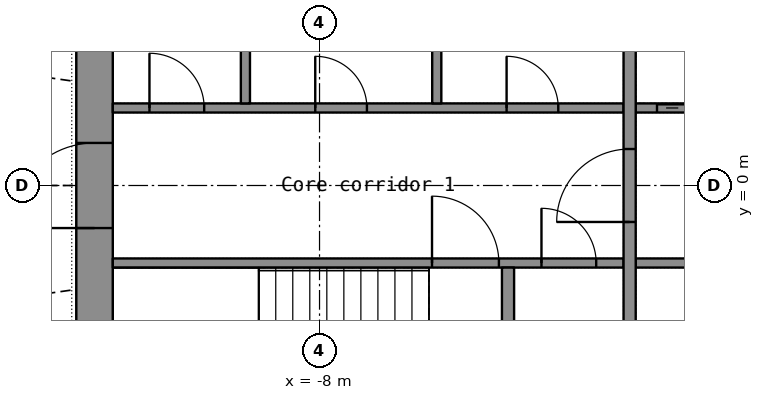
"""IFC4 building model, lengths in metres.
Left out: names, types, materials, properties, quantities, classifications, styles, units other than length and angle.
Written with IfcOpenShell. Run it as: python <this file> out.ifc"""

import sys

from ifc_helpers import new_model, si_unit, direction, frame, frame_2d, origin, place, context, subcontext, project, spatial, rectangle, extrude, element, fill, save


model = new_model("IFC4")
c1 = context("Model", 3, precision=1e-05, world=origin(), true_north=direction((0.0, 1.0)))
c2 = subcontext(c1, "Body", "Model", "MODEL_VIEW")
j1 = project(units=[si_unit("LENGTHUNIT", "METRE"), si_unit("PLANEANGLEUNIT", "RADIAN")], contexts=[c1])
p1 = place(None, origin())
s1 = spatial("IfcSite", under=j1, at=p1, CompositionType="ELEMENT")
p2 = place(p1, origin())
s2 = spatial("IfcBuilding", under=s1, at=p2, CompositionType="ELEMENT")
p3 = place(p2, frame((0.0, 0.0, 37.1)))
s3 = spatial("IfcBuildingStorey", under=s2, at=p3, CompositionType="ELEMENT", Elevation=37.1)
p4 = place(p3, frame((-11.7, -7.2, 0.0), z_axis=(0.0, 0.0, 1.0), x_axis=(0.0, 1.0, 0.0)))
e1 = element("IfcWall", 1, at=p4, inside=s3, PredefinedType="SHEAR", context=c2, shape_type="SweptSolid", body=[
    extrude(rectangle(XDim=14.4, YDim=0.6, at=frame_2d((7.2, 0.0))), origin(), (0.0, 0.0, 1.0), 3.3),
])
p5 = place(p4, frame((6.5, 0.0, 0.0)))
e2 = element("IfcOpeningElement", 2, at=p5, cuts=e1, PredefinedType="OPENING", context=c2, shape_type="SweptSolid", body=[
    extrude(rectangle(XDim=1.4, YDim=2.2, at=frame_2d((0.7, 1.1))), frame((0.0, 0.31, 0.0), z_axis=(0.0, -1.0, 0.0), x_axis=(1.0, 0.0, 0.0)), (0.0, 0.0, 1.0), 0.62),
])
p6 = place(p3, frame((-11.4, -1.275, 0.0), z_axis=(0.0, 0.0, 1.0), x_axis=(1.0, 0.0, 0.0)))
e3 = element("IfcWall", 3, at=p6, inside=s3, PredefinedType="SHEAR", context=c2, shape_type="SweptSolid", body=[
    extrude(rectangle(XDim=8.4, YDim=0.15, at=frame_2d((4.2, 0.0))), origin(), (0.0, 0.0, 1.0), 3.3),
])
p7 = place(p6, frame((5.25, 0.0, 0.0)))
e4 = element("IfcOpeningElement", 4, at=p7, cuts=e3, PredefinedType="OPENING", context=c2, shape_type="SweptSolid", body=[
    extrude(rectangle(XDim=1.1, YDim=2.15, at=frame_2d((0.55, 1.075))), frame((0.0, 0.085, 0.0), z_axis=(0.0, -1.0, 0.0), x_axis=(1.0, 0.0, 0.0)), (0.0, 0.0, 1.0), 0.17),
])
p8 = place(p6, frame((7.05, 0.0, 0.0)))
e5 = element("IfcOpeningElement", 5, at=p8, cuts=e3, PredefinedType="OPENING", context=c2, shape_type="SweptSolid", body=[
    extrude(rectangle(XDim=0.9, YDim=2.1, at=frame_2d((0.45, 1.05))), frame((0.0, 0.085, 0.0), z_axis=(0.0, -1.0, 0.0), x_axis=(1.0, 0.0, 0.0)), (0.0, 0.0, 1.0), 0.17),
])
p9 = place(p3, frame((-2.8, -1.275, 0.0), z_axis=(0.0, 0.0, 1.0), x_axis=(1.0, 0.0, 0.0)))
e6 = element("IfcWall", 6, at=p9, inside=s3, PredefinedType="SHEAR", context=c2, shape_type="SweptSolid", body=[
    extrude(rectangle(XDim=5.6, YDim=0.15, at=frame_2d((2.8, 0.0))), origin(), (0.0, 0.0, 1.0), 3.3),
])
p10 = place(p9, frame((4.15, 0.0, 0.0)))
e7 = element("IfcOpeningElement", 7, at=p10, cuts=e6, PredefinedType="OPENING", context=c2, shape_type="SweptSolid", body=[
    extrude(rectangle(XDim=1.1, YDim=2.2, at=frame_2d((0.55, 1.1))), frame((0.0, 0.085, 0.0), z_axis=(0.0, -1.0, 0.0), x_axis=(1.0, 0.0, 0.0)), (0.0, 0.0, 1.0), 0.17),
])
p11 = place(p9, frame((1.35, 0.0, 0.0)))
e8 = element("IfcOpeningElement", 8, at=p11, cuts=e6, PredefinedType="OPENING", context=c2, shape_type="SweptSolid", body=[
    extrude(rectangle(XDim=0.9, YDim=2.1, at=frame_2d((0.45, 1.05))), frame((0.0, 0.085, 0.0), z_axis=(0.0, -1.0, 0.0), x_axis=(1.0, 0.0, 0.0)), (0.0, 0.0, 1.0), 0.17),
])
p12 = place(p3, frame((-11.4, 1.275, 0.0), z_axis=(0.0, 0.0, 1.0), x_axis=(1.0, 0.0, 0.0)))
e9 = element("IfcWall", 9, at=p12, inside=s3, PredefinedType="PARTITIONING", context=c2, shape_type="SweptSolid", body=[
    extrude(rectangle(XDim=8.4, YDim=0.15, at=frame_2d((4.2, 0.0))), origin(), (0.0, 0.0, 1.0), 3.3),
])
p13 = place(p12, frame((0.603, 0.0, 0.0)))
e10 = element("IfcOpeningElement", 10, at=p13, cuts=e9, PredefinedType="OPENING", context=c2, shape_type="SweptSolid", body=[
    extrude(rectangle(XDim=0.9, YDim=2.1, at=frame_2d((0.45, 1.05))), frame((0.0, 0.085, 0.0), z_axis=(0.0, -1.0, 0.0), x_axis=(1.0, 0.0, 0.0)), (0.0, 0.0, 1.0), 0.17),
])
p14 = place(p12, frame((3.33, 0.0, 0.0)))
e11 = element("IfcOpeningElement", 11, at=p14, cuts=e9, PredefinedType="OPENING", context=c2, shape_type="SweptSolid", body=[
    extrude(rectangle(XDim=0.85, YDim=2.1, at=frame_2d((0.425, 1.05))), frame((0.0, 0.085, 0.0), z_axis=(0.0, -1.0, 0.0), x_axis=(1.0, 0.0, 0.0)), (0.0, 0.0, 1.0), 0.17),
])
p15 = place(p12, frame((6.477, 0.0, 0.0)))
e12 = element("IfcOpeningElement", 12, at=p15, cuts=e9, PredefinedType="OPENING", context=c2, shape_type="SweptSolid", body=[
    extrude(rectangle(XDim=0.85, YDim=2.1, at=frame_2d((0.425, 1.05))), frame((0.0, 0.085, 0.0), z_axis=(0.0, -1.0, 0.0), x_axis=(1.0, 0.0, 0.0)), (0.0, 0.0, 1.0), 0.17),
])
p16 = place(p3, frame((-2.8, 1.275, 0.0), z_axis=(0.0, 0.0, 1.0), x_axis=(1.0, 0.0, 0.0)))
e13 = element("IfcWall", 13, at=p16, inside=s3, PredefinedType="SHEAR", context=c2, shape_type="SweptSolid", body=[
    extrude(rectangle(XDim=5.6, YDim=0.15, at=frame_2d((2.8, 0.0))), origin(), (0.0, 0.0, 1.0), 3.3),
])
p17 = place(p16, frame((0.35, 0.0, 0.0)))
e14 = element("IfcOpeningElement", 14, at=p17, cuts=e13, PredefinedType="OPENING", context=c2, shape_type="SweptSolid", body=[
    extrude(rectangle(XDim=1.1, YDim=2.2, at=frame_2d((0.55, 1.1))), frame((0.0, 0.085, 0.0), z_axis=(0.0, -1.0, 0.0), x_axis=(1.0, 0.0, 0.0)), (0.0, 0.0, 1.0), 0.17),
])
p18 = place(p16, frame((3.35, 0.0, 0.0)))
e15 = element("IfcOpeningElement", 15, at=p18, cuts=e13, PredefinedType="OPENING", context=c2, shape_type="SweptSolid", body=[
    extrude(rectangle(XDim=0.9, YDim=2.1, at=frame_2d((0.45, 1.05))), frame((0.0, 0.085, 0.0), z_axis=(0.0, -1.0, 0.0), x_axis=(1.0, 0.0, 0.0)), (0.0, 0.0, 1.0), 0.17),
])
p19 = place(p3, frame((-2.9, -3.7, 0.0), z_axis=(0.0, 0.0, 1.0), x_axis=(0.0, 1.0, 0.0)))
e16 = element("IfcWall", 16, at=p19, inside=s3, PredefinedType="SHEAR", context=c2, shape_type="SweptSolid", body=[
    extrude(rectangle(XDim=7.4, YDim=0.2, at=frame_2d((3.7, 0.0))), origin(), (0.0, 0.0, 1.0), 3.3),
])
p20 = place(p19, frame((3.1, 0.0, 0.0)))
e17 = element("IfcOpeningElement", 17, at=p20, cuts=e16, PredefinedType="OPENING", context=c2, shape_type="SweptSolid", body=[
    extrude(rectangle(XDim=1.2, YDim=2.2, at=frame_2d((0.6, 1.1))), frame((0.0, 0.11, 0.0), z_axis=(0.0, -1.0, 0.0), x_axis=(1.0, 0.0, 0.0)), (0.0, 0.0, 1.0), 0.22),
])
p21 = place(p3, frame((-4.9, -3.7, 0.0), z_axis=(0.0, 0.0, 1.0), x_axis=(0.0, 1.0, 0.0)))
e18 = element("IfcWall", 18, at=p21, inside=s3, PredefinedType="SHEAR", context=c2, shape_type="SweptSolid", body=[
    extrude(rectangle(XDim=2.35, YDim=0.2, at=frame_2d((1.175, 0.0))), origin(), (0.0, 0.0, 1.0), 3.3),
])
for number, where, z_axis, x_axis in (
    (19, (-9.219, 1.35, 0.0), (0.0, 0.0, 1.0), (0.0, 1.0, 0.0)),
    (20, (-6.072, 1.35, 0.0), (0.0, 0.0, 1.0), (0.0, 1.0, 0.0)),
):
    element("IfcWall", number, at=place(p3, frame(where, z_axis=z_axis, x_axis=x_axis)), inside=s3, PredefinedType="PARTITIONING", context=c2, shape_type="SweptSolid", body=[
        extrude(rectangle(XDim=2.35, YDim=0.15, at=frame_2d((1.175, 0.0))), origin(), (0.0, 0.0, 1.0), 3.3),
    ])
p22 = place(p5, origin())
e21 = element("IfcDoor", 21, at=p22, inside=s3, OperationType="DOUBLE_DOOR_SINGLE_SWING", PredefinedType="DOOR", context=c2, shape_type="SweptSolid", body=[
    extrude(rectangle(XDim=1.4, YDim=2.2, at=frame_2d((0.7, 1.1))), frame((0.0, 0.025, 0.0), z_axis=(0.0, -1.0, 0.0), x_axis=(1.0, 0.0, 0.0)), (0.0, 0.0, 1.0), 0.05),
])
fill(e2, e21)
p23 = place(p20, origin())
e22 = element("IfcDoor", 22, at=p23, inside=s3, OperationType="SINGLE_SWING_LEFT", PredefinedType="DOOR", context=c2, shape_type="SweptSolid", body=[
    extrude(rectangle(XDim=1.2, YDim=2.2, at=frame_2d((0.6, 1.1))), frame((0.0, 0.025, 0.0), z_axis=(0.0, -1.0, 0.0), x_axis=(1.0, 0.0, 0.0)), (0.0, 0.0, 1.0), 0.05),
])
fill(e17, e22)
p24 = place(p17, origin())
e23 = element("IfcDoor", 23, at=p24, inside=s3, OperationType="DOUBLE_DOOR_SLIDING", PredefinedType="DOOR", context=c2, shape_type="SweptSolid", body=[
    extrude(rectangle(XDim=1.1, YDim=2.2, at=frame_2d((0.55, 1.1))), frame((0.0, 0.025, 0.0), z_axis=(0.0, -1.0, 0.0), x_axis=(1.0, 0.0, 0.0)), (0.0, 0.0, 1.0), 0.05),
])
fill(e14, e23)
p25 = place(p7, origin())
e24 = element("IfcDoor", 24, at=p25, inside=s3, OperationType="SINGLE_SWING_LEFT", PredefinedType="DOOR", context=c2, shape_type="SweptSolid", body=[
    extrude(rectangle(XDim=1.1, YDim=2.15, at=frame_2d((0.55, 1.075))), frame((0.0, 0.025, 0.0), z_axis=(0.0, -1.0, 0.0), x_axis=(1.0, 0.0, 0.0)), (0.0, 0.0, 1.0), 0.05),
])
fill(e4, e24)
p26 = place(p13, origin())
e25 = element("IfcDoor", 25, at=p26, inside=s3, OperationType="SINGLE_SWING_LEFT", PredefinedType="DOOR", context=c2, shape_type="SweptSolid", body=[
    extrude(rectangle(XDim=0.9, YDim=2.1, at=frame_2d((0.45, 1.05))), frame((0.0, 0.025, 0.0), z_axis=(0.0, -1.0, 0.0), x_axis=(1.0, 0.0, 0.0)), (0.0, 0.0, 1.0), 0.05),
])
fill(e10, e25)
p27 = place(p14, origin())
e26 = element("IfcDoor", 26, at=p27, inside=s3, OperationType="SINGLE_SWING_LEFT", PredefinedType="DOOR", context=c2, shape_type="SweptSolid", body=[
    extrude(rectangle(XDim=0.85, YDim=2.1, at=frame_2d((0.425, 1.05))), frame((0.0, 0.025, 0.0), z_axis=(0.0, -1.0, 0.0), x_axis=(1.0, 0.0, 0.0)), (0.0, 0.0, 1.0), 0.05),
])
fill(e11, e26)
p28 = place(p15, origin())
e27 = element("IfcDoor", 27, at=p28, inside=s3, OperationType="SINGLE_SWING_LEFT", PredefinedType="DOOR", context=c2, shape_type="SweptSolid", body=[
    extrude(rectangle(XDim=0.85, YDim=2.1, at=frame_2d((0.425, 1.05))), frame((0.0, 0.025, 0.0), z_axis=(0.0, -1.0, 0.0), x_axis=(1.0, 0.0, 0.0)), (0.0, 0.0, 1.0), 0.05),
])
fill(e12, e27)
p29 = place(p8, origin())
e28 = element("IfcDoor", 28, at=p29, inside=s3, OperationType="SINGLE_SWING_LEFT", PredefinedType="DOOR", context=c2, shape_type="SweptSolid", body=[
    extrude(rectangle(XDim=0.9, YDim=2.1, at=frame_2d((0.45, 1.05))), frame((0.0, 0.025, 0.0), z_axis=(0.0, -1.0, 0.0), x_axis=(1.0, 0.0, 0.0)), (0.0, 0.0, 1.0), 0.05),
])
fill(e5, e28)
save(model, sys.argv[1])
